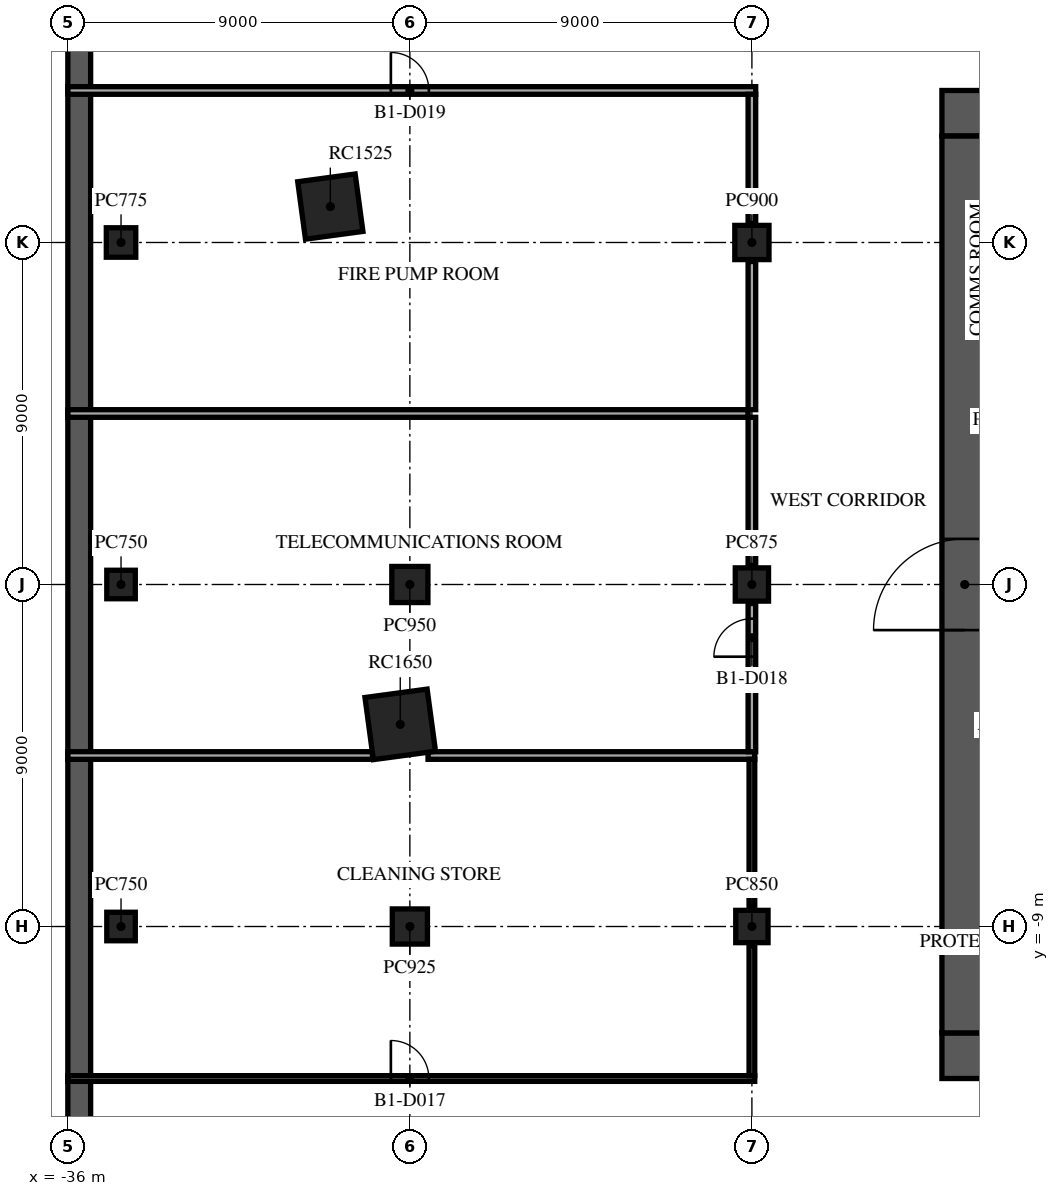
"""IFC4 building model, lengths in metres.
Left out: names, types, materials, properties, quantities, classifications, styles, units other than length and angle.
Written with IfcOpenShell. Run it as: python <this file> out.ifc"""

import sys

from ifc_helpers import new_model, si_unit, direction, frame, frame_2d, origin, origin_2d, place, context, subcontext, project, spatial, rectangle, extrude, element, fill, save


model = new_model("IFC4")
c1 = context("Model", 3, precision=1e-05, world=origin(), true_north=direction((0.0, 1.0)))
c2 = subcontext(c1, "Body", "Model", "MODEL_VIEW")
j1 = project(units=[si_unit("LENGTHUNIT", "METRE"), si_unit("PLANEANGLEUNIT", "RADIAN")], contexts=[c1])
p1 = place(None, origin())
s1 = spatial("IfcSite", under=j1, at=p1, CompositionType="ELEMENT")
p2 = place(p1, origin())
s2 = spatial("IfcBuilding", under=s1, at=p2, CompositionType="ELEMENT")
p3 = place(p2, frame((0.0, 0.0, -4.5)))
s3 = spatial("IfcBuildingStorey", under=s2, at=p3, CompositionType="ELEMENT", Elevation=-4.5)
p4 = place(p3, frame((-35.7, 31.0, -0.3), z_axis=(0.0, 0.0, 1.0), x_axis=(0.0, -1.0, 0.0)))
e1 = element("IfcWall", 1, at=p4, inside=s3, PredefinedType="SOLIDWALL", context=c2, shape_type="SweptSolid", body=[
    extrude(rectangle(XDim=62.0, YDim=0.6, at=frame_2d((31.0, 0.0))), origin(), (0.0, 0.0, 1.0), 4.4),
])
for number, where, z_axis, x_axis in (
    (2, (-34.6, -9.0, 0.0), (0.0, 0.0, 1.0), (1.0, 0.0, 0.0)),
    (3, (-34.6, 0.0, 0.0), (0.0, 0.0, 1.0), (1.0, 0.0, 0.0)),
):
    element("IfcColumn", number, at=place(p3, frame(where, z_axis=z_axis, x_axis=x_axis)), inside=s3, PredefinedType="COLUMN", context=c2, shape_type="SweptSolid", body=[
        extrude(rectangle(XDim=0.75, YDim=0.75, at=origin_2d()), origin(), (0.0, 0.0, 1.0), 4.5),
    ])
p5 = place(p3, frame((-34.6, 9.0, 0.0), z_axis=(0.0, 0.0, 1.0), x_axis=(1.0, 0.0, 0.0)))
e4 = element("IfcColumn", 4, at=p5, inside=s3, PredefinedType="COLUMN", context=c2, shape_type="SweptSolid", body=[
    extrude(rectangle(XDim=0.775, YDim=0.775, at=origin_2d()), origin(), (0.0, 0.0, 1.0), 4.5),
])
p6 = place(p3, frame((-27.0, -9.0, 0.0), z_axis=(0.0, 0.0, 1.0), x_axis=(1.0, 0.0, 0.0)))
e5 = element("IfcColumn", 5, at=p6, inside=s3, PredefinedType="COLUMN", context=c2, shape_type="SweptSolid", body=[
    extrude(rectangle(XDim=0.925, YDim=0.925, at=origin_2d()), origin(), (0.0, 0.0, 1.0), 4.5),
])
p7 = place(p3, frame((-27.0, 0.0, 0.0), z_axis=(0.0, 0.0, 1.0), x_axis=(1.0, 0.0, 0.0)))
e6 = element("IfcColumn", 6, at=p7, inside=s3, PredefinedType="COLUMN", context=c2, shape_type="SweptSolid", body=[
    extrude(rectangle(XDim=0.95, YDim=0.95, at=origin_2d()), origin(), (0.0, 0.0, 1.0), 4.5),
])
p8 = place(p3, frame((-18.0, -9.0, 0.0), z_axis=(0.0, 0.0, 1.0), x_axis=(1.0, 0.0, 0.0)))
e7 = element("IfcColumn", 7, at=p8, inside=s3, PredefinedType="COLUMN", context=c2, shape_type="SweptSolid", body=[
    extrude(rectangle(XDim=0.85, YDim=0.85, at=origin_2d()), origin(), (0.0, 0.0, 1.0), 4.5),
])
p9 = place(p3, frame((-18.0, 0.0, 0.0), z_axis=(0.0, 0.0, 1.0), x_axis=(1.0, 0.0, 0.0)))
e8 = element("IfcColumn", 8, at=p9, inside=s3, PredefinedType="COLUMN", context=c2, shape_type="SweptSolid", body=[
    extrude(rectangle(XDim=0.875, YDim=0.875, at=origin_2d()), origin(), (0.0, 0.0, 1.0), 4.5),
])
p10 = place(p3, frame((-18.0, 9.0, 0.0), z_axis=(0.0, 0.0, 1.0), x_axis=(1.0, 0.0, 0.0)))
e9 = element("IfcColumn", 9, at=p10, inside=s3, PredefinedType="COLUMN", context=c2, shape_type="SweptSolid", body=[
    extrude(rectangle(XDim=0.9, YDim=0.9, at=origin_2d()), origin(), (0.0, 0.0, 1.0), 4.5),
])
p11 = place(p3, frame((-29.093, 9.945, 0.0), z_axis=(0.0, 0.0, 1.0), x_axis=(0.991001197216, 0.133853005627, 0.0)))
e10 = element("IfcColumn", 10, at=p11, inside=s3, PredefinedType="COLUMN", context=c2, shape_type="SweptSolid", body=[
    extrude(rectangle(XDim=1.525, YDim=1.525, at=origin_2d()), origin(), (0.0, 0.0, 1.0), 4.5),
])
p12 = place(p3, frame((-27.253, -3.681, 0.0), z_axis=(0.0, 0.0, 1.0), x_axis=(0.991001197216, 0.133853005627, 0.0)))
e11 = element("IfcColumn", 11, at=p12, inside=s3, PredefinedType="COLUMN", context=c2, shape_type="SweptSolid", body=[
    extrude(rectangle(XDim=1.65, YDim=1.65, at=origin_2d()), origin(), (0.0, 0.0, 1.0), 4.5),
])
p13 = place(p3, frame((-13.0, 12.4, 0.0), z_axis=(0.0, 0.0, 1.0), x_axis=(1.0, 0.0, 0.0)))
e12 = element("IfcWall", 12, at=p13, inside=s3, PredefinedType="SHEAR", context=c2, shape_type="SweptSolid", body=[
    extrude(rectangle(XDim=26.0, YDim=1.2, at=frame_2d((13.0, 0.0))), origin(), (0.0, 0.0, 1.0), 4.1),
])
p14 = place(p13, frame((11.8, 0.0, 0.0)))
e13 = element("IfcOpeningElement", 13, at=p14, cuts=e12, PredefinedType="OPENING", context=c2, shape_type="SweptSolid", body=[
    extrude(rectangle(XDim=2.4, YDim=2.4, at=frame_2d((1.2, 1.2))), frame((0.0, 0.61, 0.0), z_axis=(0.0, -1.0, 0.0), x_axis=(1.0, 0.0, 0.0)), (0.0, 0.0, 1.0), 1.22),
])
p15 = place(p13, frame((22.625, 0.0, 0.0)))
e14 = element("IfcOpeningElement", 14, at=p15, cuts=e12, PredefinedType="OPENING", context=c2, shape_type="SweptSolid", body=[
    extrude(rectangle(XDim=1.2, YDim=2.1, at=frame_2d((0.6, 1.05))), frame((0.0, 0.61, 0.0), z_axis=(0.0, -1.0, 0.0), x_axis=(1.0, 0.0, 0.0)), (0.0, 0.0, 1.0), 1.22),
])
p16 = place(p13, frame((1.6, 0.0, 0.0)))
e15 = element("IfcOpeningElement", 15, at=p16, cuts=e12, PredefinedType="OPENING", context=c2, shape_type="SweptSolid", body=[
    extrude(rectangle(XDim=1.0, YDim=2.1, at=frame_2d((0.5, 1.05))), frame((0.0, 0.61, 0.0), z_axis=(0.0, -1.0, 0.0), x_axis=(1.0, 0.0, 0.0)), (0.0, 0.0, 1.0), 1.22),
])
p17 = place(p3, frame((-13.0, -12.4, 0.0), z_axis=(0.0, 0.0, 1.0), x_axis=(1.0, 0.0, 0.0)))
e16 = element("IfcWall", 16, at=p17, inside=s3, PredefinedType="SHEAR", context=c2, shape_type="SweptSolid", body=[
    extrude(rectangle(XDim=26.0, YDim=1.2, at=frame_2d((13.0, 0.0))), origin(), (0.0, 0.0, 1.0), 4.1),
])
p18 = place(p17, frame((7.9, 0.0, 0.0)))
e17 = element("IfcOpeningElement", 17, at=p18, cuts=e16, PredefinedType="OPENING", context=c2, shape_type="SweptSolid", body=[
    extrude(rectangle(XDim=2.0, YDim=2.1, at=frame_2d((1.0, 1.05))), frame((0.0, 0.61, 0.0), z_axis=(0.0, -1.0, 0.0), x_axis=(1.0, 0.0, 0.0)), (0.0, 0.0, 1.0), 1.22),
])
p19 = place(p17, frame((18.025, 0.0, 0.0)))
e18 = element("IfcOpeningElement", 18, at=p19, cuts=e16, PredefinedType="OPENING", context=c2, shape_type="SweptSolid", body=[
    extrude(rectangle(XDim=1.2, YDim=2.1, at=frame_2d((0.6, 1.05))), frame((0.0, 0.61, 0.0), z_axis=(0.0, -1.0, 0.0), x_axis=(1.0, 0.0, 0.0)), (0.0, 0.0, 1.0), 1.22),
])
p20 = place(p17, frame((2.175, 0.0, 0.0)))
e19 = element("IfcOpeningElement", 19, at=p20, cuts=e16, PredefinedType="OPENING", context=c2, shape_type="SweptSolid", body=[
    extrude(rectangle(XDim=1.2, YDim=2.1, at=frame_2d((0.6, 1.05))), frame((0.0, 0.61, 0.0), z_axis=(0.0, -1.0, 0.0), x_axis=(1.0, 0.0, 0.0)), (0.0, 0.0, 1.0), 1.22),
])
p21 = place(p17, frame((22.625, 0.0, 0.0)))
e20 = element("IfcOpeningElement", 20, at=p21, cuts=e16, PredefinedType="OPENING", context=c2, shape_type="SweptSolid", body=[
    extrude(rectangle(XDim=1.2, YDim=2.1, at=frame_2d((0.6, 1.05))), frame((0.0, 0.61, 0.0), z_axis=(0.0, -1.0, 0.0), x_axis=(1.0, 0.0, 0.0)), (0.0, 0.0, 1.0), 1.22),
])
p22 = place(p3, frame((-12.4, -11.8, 0.0), z_axis=(0.0, 0.0, 1.0), x_axis=(0.0, 1.0, 0.0)))
e21 = element("IfcWall", 21, at=p22, inside=s3, PredefinedType="SHEAR", context=c2, shape_type="SweptSolid", body=[
    extrude(rectangle(XDim=23.6, YDim=1.2, at=frame_2d((11.8, 0.0))), origin(), (0.0, 0.0, 1.0), 4.1),
])
p23 = place(p22, frame((10.6, 0.0, 0.0)))
e22 = element("IfcOpeningElement", 22, at=p23, cuts=e21, PredefinedType="OPENING", context=c2, shape_type="SweptSolid", body=[
    extrude(rectangle(XDim=2.4, YDim=2.4, at=frame_2d((1.2, 1.2))), frame((0.0, 0.61, 0.0), z_axis=(0.0, -1.0, 0.0), x_axis=(1.0, 0.0, 0.0)), (0.0, 0.0, 1.0), 1.22),
])
p24 = place(p3, frame((-36.0, -13.0, 0.0), z_axis=(0.0, 0.0, 1.0), x_axis=(1.0, 0.0, 0.0)))
e23 = element("IfcWall", 23, at=p24, inside=s3, PredefinedType="PARTITIONING", context=c2, shape_type="SweptSolid", body=[
    extrude(rectangle(XDim=18.075, YDim=0.15, at=frame_2d((9.038, 0.0))), origin(), (0.0, 0.0, 1.0), 4.1),
])
p25 = place(p24, frame((8.5, 0.0, 0.0)))
e24 = element("IfcOpeningElement", 24, at=p25, cuts=e23, PredefinedType="OPENING", context=c2, shape_type="SweptSolid", body=[
    extrude(rectangle(XDim=1.0, YDim=2.1, at=frame_2d((0.5, 1.05))), frame((0.0, 0.085, 0.0), z_axis=(0.0, -1.0, 0.0), x_axis=(1.0, 0.0, 0.0)), (0.0, 0.0, 1.0), 0.17),
])
p26 = place(p3, frame((-36.0, -4.5, 0.0), z_axis=(0.0, 0.0, 1.0), x_axis=(1.0, 0.0, 0.0)))
e25 = element("IfcWall", 25, at=p26, inside=s3, PredefinedType="PARTITIONING", context=c2, shape_type="SweptSolid", body=[
    extrude(rectangle(XDim=8.016, YDim=0.2, at=frame_2d((4.008, 0.0))), origin(), (0.0, 0.0, 1.0), 4.1),
])
p27 = place(p3, frame((-26.522, -4.5, 0.0), z_axis=(0.0, 0.0, 1.0), x_axis=(1.0, 0.0, 0.0)))
e26 = element("IfcWall", 26, at=p27, inside=s3, PredefinedType="PARTITIONING", context=c2, shape_type="SweptSolid", body=[
    extrude(rectangle(XDim=8.597, YDim=0.2, at=frame_2d((4.298, 0.0))), origin(), (0.0, 0.0, 1.0), 4.1),
])
p28 = place(p3, frame((-36.0, 4.5, 0.0), z_axis=(0.0, 0.0, 1.0), x_axis=(1.0, 0.0, 0.0)))
e27 = element("IfcWall", 27, at=p28, inside=s3, PredefinedType="PARTITIONING", context=c2, shape_type="SweptSolid", body=[
    extrude(rectangle(XDim=17.9, YDim=0.2, at=frame_2d((8.95, 0.0))), origin(), (0.0, 0.0, 1.0), 4.1),
])
p29 = place(p3, frame((-36.0, 13.0, 0.0), z_axis=(0.0, 0.0, 1.0), x_axis=(1.0, 0.0, 0.0)))
e28 = element("IfcWall", 28, at=p29, inside=s3, PredefinedType="PARTITIONING", context=c2, shape_type="SweptSolid", body=[
    extrude(rectangle(XDim=18.1, YDim=0.2, at=frame_2d((9.05, 0.0))), origin(), (0.0, 0.0, 1.0), 4.1),
])
p30 = place(p29, frame((8.5, 0.0, 0.0)))
e29 = element("IfcOpeningElement", 29, at=p30, cuts=e28, PredefinedType="OPENING", context=c2, shape_type="SweptSolid", body=[
    extrude(rectangle(XDim=1.0, YDim=2.1, at=frame_2d((0.5, 1.05))), frame((0.0, 0.11, 0.0), z_axis=(0.0, -1.0, 0.0), x_axis=(1.0, 0.0, 0.0)), (0.0, 0.0, 1.0), 0.22),
])
p31 = place(p3, frame((-18.0, -12.925, 0.0), z_axis=(0.0, 0.0, 1.0), x_axis=(0.0, 1.0, 0.0)))
e30 = element("IfcWall", 30, at=p31, inside=s3, PredefinedType="PARTITIONING", context=c2, shape_type="SweptSolid", body=[
    extrude(rectangle(XDim=3.425, YDim=0.15, at=frame_2d((1.712, 0.0))), origin(), (0.0, 0.0, 1.0), 4.1),
])
p32 = place(p3, frame((-18.0, -8.5, 0.0), z_axis=(0.0, 0.0, 1.0), x_axis=(0.0, 1.0, 0.0)))
e31 = element("IfcWall", 31, at=p32, inside=s3, PredefinedType="PARTITIONING", context=c2, shape_type="SweptSolid", body=[
    extrude(rectangle(XDim=3.9, YDim=0.15, at=frame_2d((1.95, 0.0))), origin(), (0.0, 0.0, 1.0), 4.1),
])
p33 = place(p3, frame((-18.0, -4.4, 0.0), z_axis=(0.0, 0.0, 1.0), x_axis=(0.0, 1.0, 0.0)))
e32 = element("IfcWall", 32, at=p33, inside=s3, PredefinedType="PARTITIONING", context=c2, shape_type="SweptSolid", body=[
    extrude(rectangle(XDim=3.9, YDim=0.2, at=frame_2d((1.95, 0.0))), origin(), (0.0, 0.0, 1.0), 4.1),
])
p34 = place(p33, frame((2.5, 0.0, 0.0)))
e33 = element("IfcOpeningElement", 33, at=p34, cuts=e32, PredefinedType="OPENING", context=c2, shape_type="SweptSolid", body=[
    extrude(rectangle(XDim=1.0, YDim=2.1, at=frame_2d((0.5, 1.05))), frame((0.0, 0.11, 0.0), z_axis=(0.0, -1.0, 0.0), x_axis=(1.0, 0.0, 0.0)), (0.0, 0.0, 1.0), 0.22),
])
for number, where, z_axis, x_axis in (
    (34, (-18.0, 0.5, 0.0), (0.0, 0.0, 1.0), (0.0, 1.0, 0.0)),
    (35, (-18.0, 4.6, 0.0), (0.0, 0.0, 1.0), (0.0, 1.0, 0.0)),
):
    element("IfcWall", number, at=place(p3, frame(where, z_axis=z_axis, x_axis=x_axis)), inside=s3, PredefinedType="PARTITIONING", context=c2, shape_type="SweptSolid", body=[
        extrude(rectangle(XDim=3.9, YDim=0.2, at=frame_2d((1.95, 0.0))), origin(), (0.0, 0.0, 1.0), 4.1),
    ])
p35 = place(p3, frame((-18.0, 9.5, 0.0), z_axis=(0.0, 0.0, 1.0), x_axis=(0.0, 1.0, 0.0)))
e36 = element("IfcWall", 36, at=p35, inside=s3, PredefinedType="PARTITIONING", context=c2, shape_type="SweptSolid", body=[
    extrude(rectangle(XDim=3.4, YDim=0.2, at=frame_2d((1.7, 0.0))), origin(), (0.0, 0.0, 1.0), 4.1),
])
p36 = place(p23, origin())
e37 = element("IfcDoor", 37, at=p36, inside=s3, OperationType="SINGLE_SWING_LEFT", PredefinedType="DOOR", context=c2, shape_type="SweptSolid", body=[
    extrude(rectangle(XDim=2.4, YDim=2.4, at=frame_2d((1.2, 1.2))), frame((0.0, 0.025, 0.0), z_axis=(0.0, -1.0, 0.0), x_axis=(1.0, 0.0, 0.0)), (0.0, 0.0, 1.0), 0.05),
])
fill(e22, e37)
p37 = place(p25, origin())
e38 = element("IfcDoor", 38, at=p37, inside=s3, OperationType="SINGLE_SWING_LEFT", PredefinedType="DOOR", context=c2, shape_type="SweptSolid", body=[
    extrude(rectangle(XDim=1.0, YDim=2.1, at=frame_2d((0.5, 1.05))), frame((0.0, 0.025, 0.0), z_axis=(0.0, -1.0, 0.0), x_axis=(1.0, 0.0, 0.0)), (0.0, 0.0, 1.0), 0.05),
])
fill(e24, e38)
p38 = place(p34, origin())
e39 = element("IfcDoor", 39, at=p38, inside=s3, OperationType="SINGLE_SWING_RIGHT", PredefinedType="DOOR", context=c2, shape_type="SweptSolid", body=[
    extrude(rectangle(XDim=1.0, YDim=2.1, at=frame_2d((0.5, 1.05))), frame((0.0, 0.025, 0.0), z_axis=(0.0, -1.0, 0.0), x_axis=(1.0, 0.0, 0.0)), (0.0, 0.0, 1.0), 0.05),
])
fill(e33, e39)
p39 = place(p30, origin())
e40 = element("IfcDoor", 40, at=p39, inside=s3, OperationType="SINGLE_SWING_LEFT", PredefinedType="DOOR", context=c2, shape_type="SweptSolid", body=[
    extrude(rectangle(XDim=1.0, YDim=2.1, at=frame_2d((0.5, 1.05))), frame((0.0, 0.025, 0.0), z_axis=(0.0, -1.0, 0.0), x_axis=(1.0, 0.0, 0.0)), (0.0, 0.0, 1.0), 0.05),
])
fill(e29, e40)
save(model, sys.argv[1])
